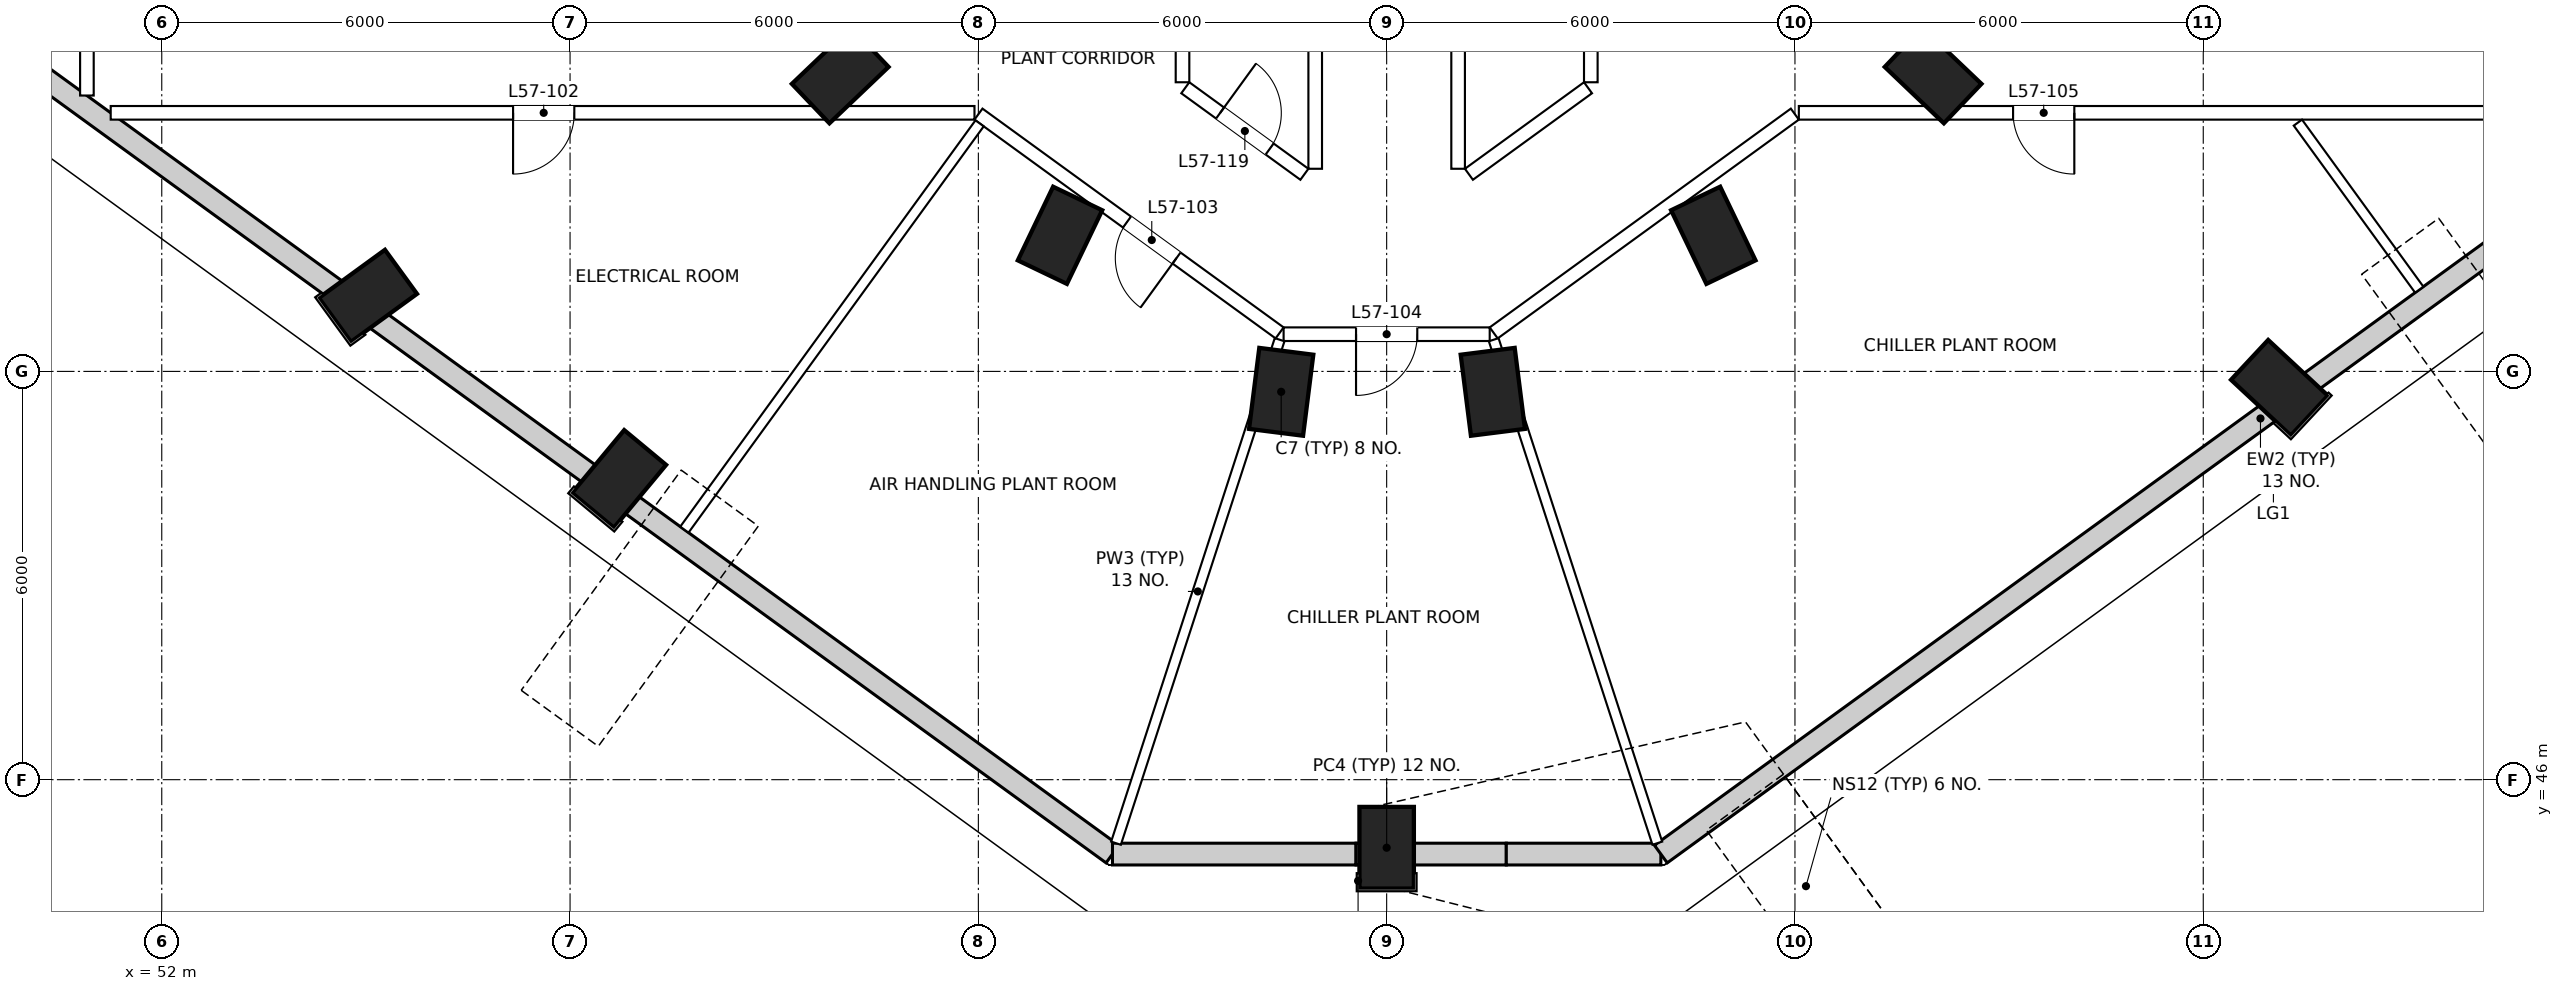
"""IFC4 building model, lengths in metres.
Left out: names, types, materials, properties, quantities, classifications, styles, units other than length and angle.
Written with IfcOpenShell. Run it as: python <this file> out.ifc"""

import sys

from ifc_helpers import new_model, si_unit, direction, frame, frame_2d, origin, origin_2d, place, context, subcontext, project, spatial, rectangle, extrude, element, fill, save


model = new_model("IFC4")
c1 = context("Model", 3, precision=1e-05, world=origin(), true_north=direction((0.0, 1.0)))
c2 = subcontext(c1, "Body", "Model", "MODEL_VIEW")
j1 = project(units=[si_unit("LENGTHUNIT", "METRE"), si_unit("PLANEANGLEUNIT", "RADIAN")], contexts=[c1])
p1 = place(None, origin())
s1 = spatial("IfcSite", under=j1, at=p1, CompositionType="ELEMENT")
p2 = place(p1, origin())
s2 = spatial("IfcBuilding", under=s1, at=p2, CompositionType="ELEMENT")
p3 = place(p2, frame((0.0, 0.0, 243.3)))
s3 = spatial("IfcBuildingStorey", under=s2, at=p3, CompositionType="ELEMENT", Elevation=243.3)
for number, where, z_axis, x_axis in (
    (1, (55.03, 53.11, 0.0), (0.0, 0.0, 1.0), (-0.588, 0.809, 0.0)),
    (2, (58.72, 50.42, 0.0), (0.0, 0.0, 1.0), (-0.769, 0.639, 0.0)),
    (3, (70.0, 45.0, 0.0), (0.0, 0.0, 1.0), (-1.0, 0.0, 0.0)),
    (4, (83.12, 51.76, 0.0), (0.0, 0.0, 1.0), (-0.682, -0.731, 0.0)),
    (5, (61.97, 56.35, 0.0), (0.0, 0.0, 1.0), (-0.69, 0.724, 0.0)),
    (6, (65.2, 54.0, 0.0), (0.0, 0.0, 1.0), (-0.902, 0.432, 0.0)),
    (7, (68.45, 51.7, 0.0), (0.0, 0.0, 1.0), (-0.992, 0.126, 0.0)),
    (8, (71.56, 51.7, 0.0), (0.0, 0.0, 1.0), (-0.992, -0.126, 0.0)),
    (9, (74.8, 54.0, 0.0), (0.0, 0.0, 1.0), (-0.902, -0.432, 0.0)),
    (10, (78.03, 56.35, 0.0), (0.0, 0.0, 1.0), (-0.69, -0.724, 0.0)),
):
    element("IfcColumn", number, at=place(p3, frame(where, z_axis=z_axis, x_axis=x_axis)), inside=s3, PredefinedType="COLUMN", context=c2, shape_type="SweptSolid", body=[
        extrude(rectangle(XDim=0.8, YDim=1.2, at=origin_2d()), origin(), (0.0, 0.0, 1.0), 5.0),
    ])
p4 = place(p3, frame((48.348, 57.711, 0.0), z_axis=(0.0, 0.0, 1.0), x_axis=(0.809019511949, -0.587781787133, 0.0)))
e11 = element("IfcWall", 11, at=p4, inside=s3, PredefinedType="SOLIDWALL", context=c2, shape_type="SweptSolid", body=[
    extrude(rectangle(XDim=21.783, YDim=0.32, at=frame_2d((10.892, 0.0))), origin(), (0.0, 0.0, 1.0), 4.7),
])
p5 = place(p3, frame((65.971, 44.907, 0.0), z_axis=(0.0, 0.0, 1.0), x_axis=(1.0, 0.0, 0.0)))
e12 = element("IfcWall", 12, at=p5, inside=s3, PredefinedType="SOLIDWALL", context=c2, shape_type="SweptSolid", body=[
    extrude(rectangle(XDim=3.579, YDim=0.32, at=frame_2d((1.79, 0.0))), origin(), (0.0, 0.0, 1.0), 4.7),
])
p6 = place(p3, frame((69.55, 44.907, 0.0), z_axis=(0.0, 0.0, 1.0), x_axis=(1.0, 0.0, 0.0)))
e13 = element("IfcWall", 13, at=p6, inside=s3, PredefinedType="SOLIDWALL", context=c2, shape_type="SweptSolid", body=[
    extrude(rectangle(XDim=2.208, YDim=0.32, at=frame_2d((1.104, 0.0))), origin(), (0.0, 0.0, 1.0), 3.67),
])
p7 = place(p3, frame((71.758, 44.907, 0.0), z_axis=(0.0, 0.0, 1.0), x_axis=(1.0, 0.0, 0.0)))
e14 = element("IfcWall", 14, at=p7, inside=s3, PredefinedType="SOLIDWALL", context=c2, shape_type="SweptSolid", body=[
    extrude(rectangle(XDim=2.271, YDim=0.32, at=frame_2d((1.135, 0.0))), origin(), (0.0, 0.0, 1.0), 4.7),
])
p8 = place(p3, frame((74.029, 44.907, 0.0), z_axis=(0.0, 0.0, 1.0), x_axis=(0.809019511949, 0.587781787133, 0.0)))
e15 = element("IfcWall", 15, at=p8, inside=s3, PredefinedType="SOLIDWALL", context=c2, shape_type="SweptSolid", body=[
    extrude(rectangle(XDim=21.783, YDim=0.32, at=frame_2d((10.892, 0.0))), origin(), (0.0, 0.0, 1.0), 4.7),
])
p9 = place(p3, frame((88.75, 55.8, 0.0), z_axis=(0.0, 0.0, 1.0), x_axis=(-1.0, 0.0, 0.0)))
e16 = element("IfcWall", 16, at=p9, inside=s3, PredefinedType="PARTITIONING", context=c2, shape_type="SweptSolid", body=[
    extrude(rectangle(XDim=12.693, YDim=0.2, at=frame_2d((6.347, 0.0))), origin(), (0.0, 0.0, 1.0), 3.7),
])
p10 = place(p9, frame((8.645, 0.0, 0.0)))
e17 = element("IfcOpeningElement", 17, at=p10, cuts=e16, PredefinedType="OPENING", context=c2, shape_type="SweptSolid", body=[
    extrude(rectangle(XDim=0.9, YDim=2.1, at=frame_2d((0.45, 1.05))), frame((0.0, 0.11, 0.0), z_axis=(0.0, -1.0, 0.0), x_axis=(1.0, 0.0, 0.0)), (0.0, 0.0, 1.0), 0.22),
])
p11 = place(p3, frame((75.998, 55.781, 0.0), z_axis=(0.0, 0.0, 1.0), x_axis=(-0.809023570974, -0.587776200274, 0.0)))
e18 = element("IfcWall", 18, at=p11, inside=s3, PredefinedType="PARTITIONING", context=c2, shape_type="SweptSolid", body=[
    extrude(rectangle(XDim=5.47, YDim=0.2, at=frame_2d((2.735, 0.0))), origin(), (0.0, 0.0, 1.0), 3.7),
])
p12 = place(p3, frame((71.514, 52.547, 0.0), z_axis=(0.0, 0.0, 1.0), x_axis=(-1.0, 0.0, 0.0)))
e19 = element("IfcWall", 19, at=p12, inside=s3, PredefinedType="PARTITIONING", context=c2, shape_type="SweptSolid", body=[
    extrude(rectangle(XDim=3.029, YDim=0.2, at=frame_2d((1.514, 0.0))), origin(), (0.0, 0.0, 1.0), 3.7),
])
p13 = place(p12, frame((1.064, 0.0, 0.0)))
e20 = element("IfcOpeningElement", 20, at=p13, cuts=e19, PredefinedType="OPENING", context=c2, shape_type="SweptSolid", body=[
    extrude(rectangle(XDim=0.9, YDim=2.1, at=frame_2d((0.45, 1.05))), frame((0.0, 0.11, 0.0), z_axis=(0.0, -1.0, 0.0), x_axis=(1.0, 0.0, 0.0)), (0.0, 0.0, 1.0), 0.22),
])
p14 = place(p3, frame((68.427, 52.566, 0.0), z_axis=(0.0, 0.0, 1.0), x_axis=(-0.809023570974, 0.587776200274, 0.0)))
e21 = element("IfcWall", 21, at=p14, inside=s3, PredefinedType="PARTITIONING", context=c2, shape_type="SweptSolid", body=[
    extrude(rectangle(XDim=5.47, YDim=0.2, at=frame_2d((2.735, 0.0))), origin(), (0.0, 0.0, 1.0), 3.7),
])
p15 = place(p14, frame((1.872, 0.0, 0.0)))
e22 = element("IfcOpeningElement", 22, at=p15, cuts=e21, PredefinedType="OPENING", context=c2, shape_type="SweptSolid", body=[
    extrude(rectangle(XDim=0.9, YDim=2.1, at=frame_2d((0.45, 1.05))), frame((0.0, 0.11, 0.0), z_axis=(0.0, -1.0, 0.0), x_axis=(1.0, 0.0, 0.0)), (0.0, 0.0, 1.0), 0.22),
])
p16 = place(p3, frame((63.943, 55.8, 0.0), z_axis=(0.0, 0.0, 1.0), x_axis=(-1.0, 0.0, 0.0)))
e23 = element("IfcWall", 23, at=p16, inside=s3, PredefinedType="PARTITIONING", context=c2, shape_type="SweptSolid", body=[
    extrude(rectangle(XDim=12.693, YDim=0.2, at=frame_2d((6.347, 0.0))), origin(), (0.0, 0.0, 1.0), 3.7),
])
p17 = place(p16, frame((5.88, 0.0, 0.0)))
e24 = element("IfcOpeningElement", 24, at=p17, cuts=e23, PredefinedType="OPENING", context=c2, shape_type="SweptSolid", body=[
    extrude(rectangle(XDim=0.9, YDim=2.1, at=frame_2d((0.45, 1.05))), frame((0.0, 0.11, 0.0), z_axis=(0.0, -1.0, 0.0), x_axis=(1.0, 0.0, 0.0)), (0.0, 0.0, 1.0), 0.22),
])
p18 = place(p3, frame((50.9, 56.054, 0.0), z_axis=(0.0, 0.0, 1.0), x_axis=(0.0, 1.0, 0.0)))
e25 = element("IfcWall", 25, at=p18, inside=s3, PredefinedType="PARTITIONING", context=c2, shape_type="SweptSolid", body=[
    extrude(rectangle(XDim=7.796, YDim=0.2, at=frame_2d((3.898, 0.0))), origin(), (0.0, 0.0, 1.0), 4.7),
])
p19 = place(p18, frame((5.203, 0.0, 0.0)))
e26 = element("IfcOpeningElement", 26, at=p19, cuts=e25, PredefinedType="OPENING", context=c2, shape_type="SweptSolid", body=[
    extrude(rectangle(XDim=0.9, YDim=2.1, at=frame_2d((0.45, 1.05))), frame((0.0, 0.11, 0.0), z_axis=(0.0, -1.0, 0.0), x_axis=(1.0, 0.0, 0.0)), (0.0, 0.0, 1.0), 0.22),
])
p20 = place(p3, frame((71.05, 63.85, 0.0), z_axis=(0.0, 0.0, 1.0), x_axis=(0.0, -1.0, 0.0)))
e27 = element("IfcWall", 27, at=p20, inside=s3, PredefinedType="PARTITIONING", context=c2, shape_type="SweptSolid", body=[
    extrude(rectangle(XDim=8.872, YDim=0.2, at=frame_2d((4.436, 0.0))), origin(), (0.0, 0.0, 1.0), 3.7),
])
p21 = place(p20, frame((3.986, 0.0, 0.0)))
e28 = element("IfcOpeningElement", 28, at=p21, cuts=e27, PredefinedType="OPENING", context=c2, shape_type="SweptSolid", body=[
    extrude(rectangle(XDim=0.9, YDim=2.1, at=frame_2d((0.45, 1.05))), frame((0.0, 0.11, 0.0), z_axis=(0.0, -1.0, 0.0), x_axis=(1.0, 0.0, 0.0)), (0.0, 0.0, 1.0), 0.22),
])
p22 = place(p3, frame((71.209, 54.897, 0.0), z_axis=(0.0, 0.0, 1.0), x_axis=(0.809062981619, 0.587721951073, 0.0)))
e29 = element("IfcWall", 29, at=p22, inside=s3, PredefinedType="PARTITIONING", context=c2, shape_type="SweptSolid", body=[
    extrude(rectangle(XDim=2.163, YDim=0.2, at=frame_2d((1.082, 0.0))), origin(), (0.0, 0.0, 1.0), 3.7),
])
p23 = place(p3, frame((73.0, 56.249, 0.0), z_axis=(0.0, 0.0, 1.0), x_axis=(0.0, 1.0, 0.0)))
e30 = element("IfcWall", 30, at=p23, inside=s3, PredefinedType="PARTITIONING", context=c2, shape_type="SweptSolid", body=[
    extrude(rectangle(XDim=7.601, YDim=0.2, at=frame_2d((3.8, 0.0))), origin(), (0.0, 0.0, 1.0), 3.7),
])
p24 = place(p3, frame((67.041, 56.168, 0.0), z_axis=(0.0, 0.0, 1.0), x_axis=(0.809062981619, -0.587721951073, 0.0)))
e31 = element("IfcWall", 31, at=p24, inside=s3, PredefinedType="PARTITIONING", context=c2, shape_type="SweptSolid", body=[
    extrude(rectangle(XDim=2.163, YDim=0.2, at=frame_2d((1.082, 0.0))), origin(), (0.0, 0.0, 1.0), 3.7),
])
p25 = place(p24, frame((0.632, 0.0, 0.0)))
e32 = element("IfcOpeningElement", 32, at=p25, cuts=e31, PredefinedType="OPENING", context=c2, shape_type="SweptSolid", body=[
    extrude(rectangle(XDim=0.9, YDim=2.1, at=frame_2d((0.45, 1.05))), frame((0.0, 0.11, 0.0), z_axis=(0.0, -1.0, 0.0), x_axis=(1.0, 0.0, 0.0)), (0.0, 0.0, 1.0), 0.22),
])
p26 = place(p3, frame((68.95, 54.978, 0.0), z_axis=(0.0, 0.0, 1.0), x_axis=(0.0, 1.0, 0.0)))
e33 = element("IfcWall", 33, at=p26, inside=s3, PredefinedType="PARTITIONING", context=c2, shape_type="SweptSolid", body=[
    extrude(rectangle(XDim=8.872, YDim=0.2, at=frame_2d((4.436, 0.0))), origin(), (0.0, 0.0, 1.0), 3.7),
])
p27 = place(p3, frame((67.0, 63.85, 0.0), z_axis=(0.0, 0.0, 1.0), x_axis=(0.0, -1.0, 0.0)))
e34 = element("IfcWall", 34, at=p27, inside=s3, PredefinedType="PARTITIONING", context=c2, shape_type="SweptSolid", body=[
    extrude(rectangle(XDim=7.601, YDim=0.2, at=frame_2d((3.8, 0.0))), origin(), (0.0, 0.0, 1.0), 3.7),
])
for number, where, z_axis, x_axis in (
    (35, (66.023, 45.067, 0.0), (0.0, 0.0, 1.0), (0.309, 0.951, 0.0)),
    (36, (73.977, 45.067, 0.0), (0.0, 0.0, 1.0), (-0.309, 0.951, 0.0)),
):
    element("IfcWall", number, at=place(p3, frame(where, z_axis=z_axis, x_axis=x_axis)), inside=s3, PredefinedType="PARTITIONING", context=c2, shape_type="SweptSolid", body=[
        extrude(rectangle(XDim=7.78, YDim=0.15, at=frame_2d((3.89, 0.0))), origin(), (0.0, 0.0, 1.0), 3.7),
    ])
p28 = place(p3, frame((59.68, 49.675, 0.0), z_axis=(0.0, 0.0, 1.0), x_axis=(0.587793966781, 0.809010662857, 0.0)))
e37 = element("IfcWall", 37, at=p28, inside=s3, PredefinedType="PARTITIONING", context=c2, shape_type="SweptSolid", body=[
    extrude(rectangle(XDim=7.38, YDim=0.15, at=frame_2d((3.69, 0.0))), origin(), (0.0, 0.0, 1.0), 4.0),
])
p29 = place(p3, frame((85.174, 53.201, 0.0), z_axis=(0.0, 0.0, 1.0), x_axis=(-0.587803233417, 0.809003930018, 0.0)))
e38 = element("IfcWall", 38, at=p29, inside=s3, PredefinedType="PARTITIONING", context=c2, shape_type="SweptSolid", body=[
    extrude(rectangle(XDim=3.034, YDim=0.15, at=frame_2d((1.517, 0.0))), origin(), (0.0, 0.0, 1.0), 4.7),
])
p30 = place(p17, origin())
e39 = element("IfcDoor", 39, at=p30, inside=s3, OperationType="SINGLE_SWING_RIGHT", PredefinedType="DOOR", context=c2, shape_type="SweptSolid", body=[
    extrude(rectangle(XDim=0.9, YDim=2.1, at=frame_2d((0.45, 1.05))), frame((0.0, 0.025, 0.0), z_axis=(0.0, -1.0, 0.0), x_axis=(1.0, 0.0, 0.0)), (0.0, 0.0, 1.0), 0.05),
])
fill(e24, e39)
p31 = place(p15, origin())
e40 = element("IfcDoor", 40, at=p31, inside=s3, OperationType="SINGLE_SWING_LEFT", PredefinedType="DOOR", context=c2, shape_type="SweptSolid", body=[
    extrude(rectangle(XDim=0.9, YDim=2.1, at=frame_2d((0.45, 1.05))), frame((0.0, 0.025, 0.0), z_axis=(0.0, -1.0, 0.0), x_axis=(1.0, 0.0, 0.0)), (0.0, 0.0, 1.0), 0.05),
])
fill(e22, e40)
p32 = place(p13, origin())
e41 = element("IfcDoor", 41, at=p32, inside=s3, OperationType="SINGLE_SWING_RIGHT", PredefinedType="DOOR", context=c2, shape_type="SweptSolid", body=[
    extrude(rectangle(XDim=0.9, YDim=2.1, at=frame_2d((0.45, 1.05))), frame((0.0, 0.025, 0.0), z_axis=(0.0, -1.0, 0.0), x_axis=(1.0, 0.0, 0.0)), (0.0, 0.0, 1.0), 0.05),
])
fill(e20, e41)
p33 = place(p10, origin())
e42 = element("IfcDoor", 42, at=p33, inside=s3, OperationType="SINGLE_SWING_LEFT", PredefinedType="DOOR", context=c2, shape_type="SweptSolid", body=[
    extrude(rectangle(XDim=0.9, YDim=2.1, at=frame_2d((0.45, 1.05))), frame((0.0, 0.025, 0.0), z_axis=(0.0, -1.0, 0.0), x_axis=(1.0, 0.0, 0.0)), (0.0, 0.0, 1.0), 0.05),
])
fill(e17, e42)
p34 = place(p25, origin())
e43 = element("IfcDoor", 43, at=p34, inside=s3, OperationType="SINGLE_SWING_LEFT", PredefinedType="DOOR", context=c2, shape_type="SweptSolid", body=[
    extrude(rectangle(XDim=0.9, YDim=2.1, at=frame_2d((0.45, 1.05))), frame((0.0, 0.025, 0.0), z_axis=(0.0, -1.0, 0.0), x_axis=(1.0, 0.0, 0.0)), (0.0, 0.0, 1.0), 0.05),
])
fill(e32, e43)
save(model, sys.argv[1])
